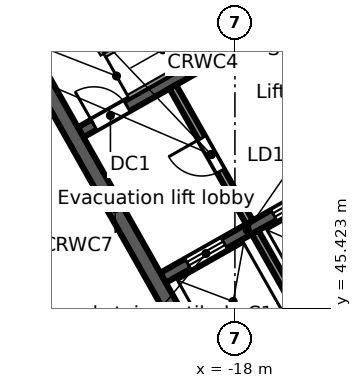
"""IFC4 building model, lengths in metres.
Left out: names, types, materials, properties, quantities, classifications, styles, units other than length and angle.
Written with IfcOpenShell. Run it as: python <this file> out.ifc"""

import sys

from ifc_helpers import new_model, si_unit, direction, frame, frame_2d, origin, place, context, subcontext, project, spatial, rectangle, extrude, element, fill, save


model = new_model("IFC4")
c1 = context("Model", 3, precision=1e-05, world=origin(), true_north=direction((0.0, 1.0)))
c2 = subcontext(c1, "Body", "Model", "MODEL_VIEW")
j1 = project(units=[si_unit("LENGTHUNIT", "METRE"), si_unit("PLANEANGLEUNIT", "RADIAN")], contexts=[c1])
p1 = place(None, origin())
s1 = spatial("IfcSite", under=j1, at=p1, CompositionType="ELEMENT")
p2 = place(p1, origin())
s2 = spatial("IfcBuilding", under=s1, at=p2, CompositionType="ELEMENT")
p3 = place(p2, frame((0.0, 0.0, 293.1)))
s3 = spatial("IfcBuildingStorey", under=s2, at=p3, CompositionType="ELEMENT", Elevation=293.1)
p4 = place(p3, frame((-58.732, 38.771, 0.0), z_axis=(0.0, 0.0, 1.0), x_axis=(0.870355615581, 0.492423702137, 0.0)))
e1 = element("IfcWall", 1, at=p4, inside=s3, PredefinedType="STANDARD", context=c2, shape_type="SweptSolid", body=[
    extrude(rectangle(XDim=64.052, YDim=0.25, at=frame_2d((32.026, 0.0))), origin(), (0.0, 0.0, 1.0), 3.52),
])
p5 = place(p4, frame((61.259, 0.0, 0.8)))
e2 = element("IfcOpeningElement", 2, at=p5, cuts=e1, PredefinedType="OPENING", context=c2, shape_type="SweptSolid", body=[
    extrude(rectangle(XDim=2.4, YDim=2.2, at=frame_2d((1.2, 1.1))), frame((0.0, 0.135, 0.0), z_axis=(0.0, -1.0, 0.0), x_axis=(1.0, 0.0, 0.0)), (0.0, 0.0, 1.0), 0.27),
])
p6 = place(p4, frame((58.216, 0.0, 0.8)))
e3 = element("IfcOpeningElement", 3, at=p6, cuts=e1, PredefinedType="OPENING", context=c2, shape_type="SweptSolid", body=[
    extrude(rectangle(XDim=2.4, YDim=2.2, at=frame_2d((1.2, 1.1))), frame((0.0, 0.135, 0.0), z_axis=(0.0, -1.0, 0.0), x_axis=(1.0, 0.0, 0.0)), (0.0, 0.0, 1.0), 0.27),
])
p7 = place(p4, frame((55.173, 0.0, 0.8)))
e4 = element("IfcOpeningElement", 4, at=p7, cuts=e1, PredefinedType="OPENING", context=c2, shape_type="SweptSolid", body=[
    extrude(rectangle(XDim=2.4, YDim=2.2, at=frame_2d((1.2, 1.1))), frame((0.0, 0.135, 0.0), z_axis=(0.0, -1.0, 0.0), x_axis=(1.0, 0.0, 0.0)), (0.0, 0.0, 1.0), 0.27),
])
p8 = place(p4, frame((52.129, 0.0, 0.8)))
e5 = element("IfcOpeningElement", 5, at=p8, cuts=e1, PredefinedType="OPENING", context=c2, shape_type="SweptSolid", body=[
    extrude(rectangle(XDim=2.4, YDim=2.2, at=frame_2d((1.2, 1.1))), frame((0.0, 0.135, 0.0), z_axis=(0.0, -1.0, 0.0), x_axis=(1.0, 0.0, 0.0)), (0.0, 0.0, 1.0), 0.27),
])
p9 = place(p4, frame((49.086, 0.0, 0.8)))
e6 = element("IfcOpeningElement", 6, at=p9, cuts=e1, PredefinedType="OPENING", context=c2, shape_type="SweptSolid", body=[
    extrude(rectangle(XDim=2.4, YDim=2.2, at=frame_2d((1.2, 1.1))), frame((0.0, 0.135, 0.0), z_axis=(0.0, -1.0, 0.0), x_axis=(1.0, 0.0, 0.0)), (0.0, 0.0, 1.0), 0.27),
])
p10 = place(p4, frame((46.043, 0.0, 0.8)))
e7 = element("IfcOpeningElement", 7, at=p10, cuts=e1, PredefinedType="OPENING", context=c2, shape_type="SweptSolid", body=[
    extrude(rectangle(XDim=2.4, YDim=2.2, at=frame_2d((1.2, 1.1))), frame((0.0, 0.135, 0.0), z_axis=(0.0, -1.0, 0.0), x_axis=(1.0, 0.0, 0.0)), (0.0, 0.0, 1.0), 0.27),
])
p11 = place(p4, frame((43.0, 0.0, 0.8)))
e8 = element("IfcOpeningElement", 8, at=p11, cuts=e1, PredefinedType="OPENING", context=c2, shape_type="SweptSolid", body=[
    extrude(rectangle(XDim=2.4, YDim=2.2, at=frame_2d((1.2, 1.1))), frame((0.0, 0.135, 0.0), z_axis=(0.0, -1.0, 0.0), x_axis=(1.0, 0.0, 0.0)), (0.0, 0.0, 1.0), 0.27),
])
p12 = place(p4, frame((39.956, 0.0, 0.8)))
e9 = element("IfcOpeningElement", 9, at=p12, cuts=e1, PredefinedType="OPENING", context=c2, shape_type="SweptSolid", body=[
    extrude(rectangle(XDim=2.4, YDim=2.2, at=frame_2d((1.2, 1.1))), frame((0.0, 0.135, 0.0), z_axis=(0.0, -1.0, 0.0), x_axis=(1.0, 0.0, 0.0)), (0.0, 0.0, 1.0), 0.27),
])
p13 = place(p4, frame((36.913, 0.0, 0.8)))
e10 = element("IfcOpeningElement", 10, at=p13, cuts=e1, PredefinedType="OPENING", context=c2, shape_type="SweptSolid", body=[
    extrude(rectangle(XDim=2.4, YDim=2.2, at=frame_2d((1.2, 1.1))), frame((0.0, 0.135, 0.0), z_axis=(0.0, -1.0, 0.0), x_axis=(1.0, 0.0, 0.0)), (0.0, 0.0, 1.0), 0.27),
])
p14 = place(p4, frame((33.87, 0.0, 0.8)))
e11 = element("IfcOpeningElement", 11, at=p14, cuts=e1, PredefinedType="OPENING", context=c2, shape_type="SweptSolid", body=[
    extrude(rectangle(XDim=2.4, YDim=2.2, at=frame_2d((1.2, 1.1))), frame((0.0, 0.135, 0.0), z_axis=(0.0, -1.0, 0.0), x_axis=(1.0, 0.0, 0.0)), (0.0, 0.0, 1.0), 0.27),
])
p15 = place(p4, frame((30.826, 0.0, 0.8)))
e12 = element("IfcOpeningElement", 12, at=p15, cuts=e1, PredefinedType="OPENING", context=c2, shape_type="SweptSolid", body=[
    extrude(rectangle(XDim=2.4, YDim=2.2, at=frame_2d((1.2, 1.1))), frame((0.0, 0.135, 0.0), z_axis=(0.0, -1.0, 0.0), x_axis=(1.0, 0.0, 0.0)), (0.0, 0.0, 1.0), 0.27),
])
p16 = place(p4, frame((27.783, 0.0, 0.8)))
e13 = element("IfcOpeningElement", 13, at=p16, cuts=e1, PredefinedType="OPENING", context=c2, shape_type="SweptSolid", body=[
    extrude(rectangle(XDim=2.4, YDim=2.2, at=frame_2d((1.2, 1.1))), frame((0.0, 0.135, 0.0), z_axis=(0.0, -1.0, 0.0), x_axis=(1.0, 0.0, 0.0)), (0.0, 0.0, 1.0), 0.27),
])
p17 = place(p4, frame((24.74, 0.0, 0.8)))
e14 = element("IfcOpeningElement", 14, at=p17, cuts=e1, PredefinedType="OPENING", context=c2, shape_type="SweptSolid", body=[
    extrude(rectangle(XDim=2.4, YDim=2.2, at=frame_2d((1.2, 1.1))), frame((0.0, 0.135, 0.0), z_axis=(0.0, -1.0, 0.0), x_axis=(1.0, 0.0, 0.0)), (0.0, 0.0, 1.0), 0.27),
])
p18 = place(p4, frame((21.696, 0.0, 0.8)))
e15 = element("IfcOpeningElement", 15, at=p18, cuts=e1, PredefinedType="OPENING", context=c2, shape_type="SweptSolid", body=[
    extrude(rectangle(XDim=2.4, YDim=2.2, at=frame_2d((1.2, 1.1))), frame((0.0, 0.135, 0.0), z_axis=(0.0, -1.0, 0.0), x_axis=(1.0, 0.0, 0.0)), (0.0, 0.0, 1.0), 0.27),
])
p19 = place(p4, frame((18.653, 0.0, 0.8)))
e16 = element("IfcOpeningElement", 16, at=p19, cuts=e1, PredefinedType="OPENING", context=c2, shape_type="SweptSolid", body=[
    extrude(rectangle(XDim=2.4, YDim=2.2, at=frame_2d((1.2, 1.1))), frame((0.0, 0.135, 0.0), z_axis=(0.0, -1.0, 0.0), x_axis=(1.0, 0.0, 0.0)), (0.0, 0.0, 1.0), 0.27),
])
p20 = place(p4, frame((15.61, 0.0, 0.8)))
e17 = element("IfcOpeningElement", 17, at=p20, cuts=e1, PredefinedType="OPENING", context=c2, shape_type="SweptSolid", body=[
    extrude(rectangle(XDim=2.4, YDim=2.2, at=frame_2d((1.2, 1.1))), frame((0.0, 0.135, 0.0), z_axis=(0.0, -1.0, 0.0), x_axis=(1.0, 0.0, 0.0)), (0.0, 0.0, 1.0), 0.27),
])
p21 = place(p4, frame((12.567, 0.0, 0.8)))
e18 = element("IfcOpeningElement", 18, at=p21, cuts=e1, PredefinedType="OPENING", context=c2, shape_type="SweptSolid", body=[
    extrude(rectangle(XDim=2.4, YDim=2.2, at=frame_2d((1.2, 1.1))), frame((0.0, 0.135, 0.0), z_axis=(0.0, -1.0, 0.0), x_axis=(1.0, 0.0, 0.0)), (0.0, 0.0, 1.0), 0.27),
])
p22 = place(p4, frame((9.523, 0.0, 0.8)))
e19 = element("IfcOpeningElement", 19, at=p22, cuts=e1, PredefinedType="OPENING", context=c2, shape_type="SweptSolid", body=[
    extrude(rectangle(XDim=2.4, YDim=2.2, at=frame_2d((1.2, 1.1))), frame((0.0, 0.135, 0.0), z_axis=(0.0, -1.0, 0.0), x_axis=(1.0, 0.0, 0.0)), (0.0, 0.0, 1.0), 0.27),
])
p23 = place(p4, frame((6.48, 0.0, 0.8)))
e20 = element("IfcOpeningElement", 20, at=p23, cuts=e1, PredefinedType="OPENING", context=c2, shape_type="SweptSolid", body=[
    extrude(rectangle(XDim=2.4, YDim=2.2, at=frame_2d((1.2, 1.1))), frame((0.0, 0.135, 0.0), z_axis=(0.0, -1.0, 0.0), x_axis=(1.0, 0.0, 0.0)), (0.0, 0.0, 1.0), 0.27),
])
p24 = place(p4, frame((3.437, 0.0, 0.8)))
e21 = element("IfcOpeningElement", 21, at=p24, cuts=e1, PredefinedType="OPENING", context=c2, shape_type="SweptSolid", body=[
    extrude(rectangle(XDim=2.4, YDim=2.2, at=frame_2d((1.2, 1.1))), frame((0.0, 0.135, 0.0), z_axis=(0.0, -1.0, 0.0), x_axis=(1.0, 0.0, 0.0)), (0.0, 0.0, 1.0), 0.27),
])
p25 = place(p4, frame((0.393, 0.0, 0.8)))
e22 = element("IfcOpeningElement", 22, at=p25, cuts=e1, PredefinedType="OPENING", context=c2, shape_type="SweptSolid", body=[
    extrude(rectangle(XDim=2.4, YDim=2.2, at=frame_2d((1.2, 1.1))), frame((0.0, 0.135, 0.0), z_axis=(0.0, -1.0, 0.0), x_axis=(1.0, 0.0, 0.0)), (0.0, 0.0, 1.0), 0.27),
])
p26 = place(p3, frame((-3.017, 46.293, 0.0), z_axis=(0.0, 0.0, 1.0), x_axis=(-0.870355474887, -0.492423950812, 0.0)))
e23 = element("IfcWall", 23, at=p26, inside=s3, PredefinedType="STANDARD", context=c2, shape_type="SweptSolid", body=[
    extrude(rectangle(XDim=40.34, YDim=0.25, at=frame_2d((20.17, 0.0))), origin(), (0.0, 0.0, 1.0), 3.52),
])
p27 = place(p26, frame((37.428, 0.0, 0.8)))
e24 = element("IfcOpeningElement", 24, at=p27, cuts=e23, PredefinedType="OPENING", context=c2, shape_type="SweptSolid", body=[
    extrude(rectangle(XDim=2.4, YDim=2.2, at=frame_2d((1.2, 1.1))), frame((0.0, 0.135, 0.0), z_axis=(0.0, -1.0, 0.0), x_axis=(1.0, 0.0, 0.0)), (0.0, 0.0, 1.0), 0.27),
])
p28 = place(p26, frame((34.372, 0.0, 0.0)))
e25 = element("IfcOpeningElement", 25, at=p28, cuts=e23, PredefinedType="OPENING", context=c2, shape_type="SweptSolid", body=[
    extrude(rectangle(XDim=1.8, YDim=2.4, at=frame_2d((0.9, 1.2))), frame((0.0, 0.135, 0.0), z_axis=(0.0, -1.0, 0.0), x_axis=(1.0, 0.0, 0.0)), (0.0, 0.0, 1.0), 0.27),
])
p29 = place(p26, frame((30.716, 0.0, 0.8)))
e26 = element("IfcOpeningElement", 26, at=p29, cuts=e23, PredefinedType="OPENING", context=c2, shape_type="SweptSolid", body=[
    extrude(rectangle(XDim=2.4, YDim=2.2, at=frame_2d((1.2, 1.1))), frame((0.0, 0.135, 0.0), z_axis=(0.0, -1.0, 0.0), x_axis=(1.0, 0.0, 0.0)), (0.0, 0.0, 1.0), 0.27),
])
p30 = place(p26, frame((27.36, 0.0, 0.8)))
e27 = element("IfcOpeningElement", 27, at=p30, cuts=e23, PredefinedType="OPENING", context=c2, shape_type="SweptSolid", body=[
    extrude(rectangle(XDim=2.4, YDim=2.2, at=frame_2d((1.2, 1.1))), frame((0.0, 0.135, 0.0), z_axis=(0.0, -1.0, 0.0), x_axis=(1.0, 0.0, 0.0)), (0.0, 0.0, 1.0), 0.27),
])
p31 = place(p26, frame((24.304, 0.0, 0.0)))
e28 = element("IfcOpeningElement", 28, at=p31, cuts=e23, PredefinedType="OPENING", context=c2, shape_type="SweptSolid", body=[
    extrude(rectangle(XDim=1.8, YDim=2.4, at=frame_2d((0.9, 1.2))), frame((0.0, 0.135, 0.0), z_axis=(0.0, -1.0, 0.0), x_axis=(1.0, 0.0, 0.0)), (0.0, 0.0, 1.0), 0.27),
])
p32 = place(p26, frame((20.648, 0.0, 0.8)))
e29 = element("IfcOpeningElement", 29, at=p32, cuts=e23, PredefinedType="OPENING", context=c2, shape_type="SweptSolid", body=[
    extrude(rectangle(XDim=2.4, YDim=2.2, at=frame_2d((1.2, 1.1))), frame((0.0, 0.135, 0.0), z_axis=(0.0, -1.0, 0.0), x_axis=(1.0, 0.0, 0.0)), (0.0, 0.0, 1.0), 0.27),
])
p33 = place(p26, frame((17.292, 0.0, 0.8)))
e30 = element("IfcOpeningElement", 30, at=p33, cuts=e23, PredefinedType="OPENING", context=c2, shape_type="SweptSolid", body=[
    extrude(rectangle(XDim=2.4, YDim=2.2, at=frame_2d((1.2, 1.1))), frame((0.0, 0.135, 0.0), z_axis=(0.0, -1.0, 0.0), x_axis=(1.0, 0.0, 0.0)), (0.0, 0.0, 1.0), 0.27),
])
p34 = place(p26, frame((14.236, 0.0, 0.0)))
e31 = element("IfcOpeningElement", 31, at=p34, cuts=e23, PredefinedType="OPENING", context=c2, shape_type="SweptSolid", body=[
    extrude(rectangle(XDim=1.8, YDim=2.4, at=frame_2d((0.9, 1.2))), frame((0.0, 0.135, 0.0), z_axis=(0.0, -1.0, 0.0), x_axis=(1.0, 0.0, 0.0)), (0.0, 0.0, 1.0), 0.27),
])
p35 = place(p26, frame((10.58, 0.0, 0.8)))
e32 = element("IfcOpeningElement", 32, at=p35, cuts=e23, PredefinedType="OPENING", context=c2, shape_type="SweptSolid", body=[
    extrude(rectangle(XDim=2.4, YDim=2.2, at=frame_2d((1.2, 1.1))), frame((0.0, 0.135, 0.0), z_axis=(0.0, -1.0, 0.0), x_axis=(1.0, 0.0, 0.0)), (0.0, 0.0, 1.0), 0.27),
])
p36 = place(p26, frame((7.224, 0.0, 0.8)))
e33 = element("IfcOpeningElement", 33, at=p36, cuts=e23, PredefinedType="OPENING", context=c2, shape_type="SweptSolid", body=[
    extrude(rectangle(XDim=2.4, YDim=2.2, at=frame_2d((1.2, 1.1))), frame((0.0, 0.135, 0.0), z_axis=(0.0, -1.0, 0.0), x_axis=(1.0, 0.0, 0.0)), (0.0, 0.0, 1.0), 0.27),
])
p37 = place(p26, frame((4.168, 0.0, 0.0)))
e34 = element("IfcOpeningElement", 34, at=p37, cuts=e23, PredefinedType="OPENING", context=c2, shape_type="SweptSolid", body=[
    extrude(rectangle(XDim=1.8, YDim=2.4, at=frame_2d((0.9, 1.2))), frame((0.0, 0.135, 0.0), z_axis=(0.0, -1.0, 0.0), x_axis=(1.0, 0.0, 0.0)), (0.0, 0.0, 1.0), 0.27),
])
p38 = place(p26, frame((0.512, 0.0, 0.8)))
e35 = element("IfcOpeningElement", 35, at=p38, cuts=e23, PredefinedType="OPENING", context=c2, shape_type="SweptSolid", body=[
    extrude(rectangle(XDim=2.4, YDim=2.2, at=frame_2d((1.2, 1.1))), frame((0.0, 0.135, 0.0), z_axis=(0.0, -1.0, 0.0), x_axis=(1.0, 0.0, 0.0)), (0.0, 0.0, 1.0), 0.27),
])
p39 = place(p3, frame((-17.975, 42.017, 0.0), z_axis=(0.0, 0.0, 1.0), x_axis=(0.87034965173, 0.492434243055, 0.0)))
e36 = element("IfcWall", 36, at=p39, inside=s3, PredefinedType="SOLIDWALL", context=c2, shape_type="SweptSolid", body=[
    extrude(rectangle(XDim=15.0, YDim=0.4, at=frame_2d((7.5, 0.0))), origin(), (0.0, 0.0, 1.0), 3.52),
])
p40 = place(p39, frame((6.1, 0.0, 0.0)))
e37 = element("IfcOpeningElement", 37, at=p40, cuts=e36, PredefinedType="OPENING", context=c2, shape_type="SweptSolid", body=[
    extrude(rectangle(XDim=1.2, YDim=2.1, at=frame_2d((0.6, 1.05))), frame((0.0, 0.21, 0.0), z_axis=(0.0, -1.0, 0.0), x_axis=(1.0, 0.0, 0.0)), (0.0, 0.0, 1.0), 0.42),
])
p41 = place(p3, frame((-19.892, 46.218, 0.0), z_axis=(0.0, 0.0, 1.0), x_axis=(0.870341639186, 0.492448404505, 0.0)))
e38 = element("IfcWall", 38, at=p41, inside=s3, PredefinedType="SOLIDWALL", context=c2, shape_type="SweptSolid", body=[
    extrude(rectangle(XDim=5.1, YDim=0.3, at=frame_2d((2.55, 0.0))), origin(), (0.0, 0.0, 1.0), 3.52),
])
p42 = place(p41, frame((0.75, 0.0, 0.0)))
e39 = element("IfcOpeningElement", 39, at=p42, cuts=e38, PredefinedType="OPENING", context=c2, shape_type="SweptSolid", body=[
    extrude(rectangle(XDim=1.1, YDim=2.1, at=frame_2d((0.55, 1.05))), frame((0.0, 0.16, 0.0), z_axis=(0.0, -1.0, 0.0), x_axis=(1.0, 0.0, 0.0)), (0.0, 0.0, 1.0), 0.32),
])
p43 = place(p41, frame((3.35, 0.0, 0.0)))
e40 = element("IfcOpeningElement", 40, at=p43, cuts=e38, PredefinedType="OPENING", context=c2, shape_type="SweptSolid", body=[
    extrude(rectangle(XDim=1.1, YDim=2.1, at=frame_2d((0.55, 1.05))), frame((0.0, 0.16, 0.0), z_axis=(0.0, -1.0, 0.0), x_axis=(1.0, 0.0, 0.0)), (0.0, 0.0, 1.0), 0.32),
])
p44 = place(p3, frame((-22.059, 50.047, 0.0), z_axis=(0.0, 0.0, 1.0), x_axis=(0.87035077051, 0.49243226567, 0.0)))
e41 = element("IfcWall", 41, at=p44, inside=s3, PredefinedType="SOLIDWALL", context=c2, shape_type="SweptSolid", body=[
    extrude(rectangle(XDim=7.4, YDim=0.3, at=frame_2d((3.7, 0.0))), origin(), (0.0, 0.0, 1.0), 3.52),
])
p45 = place(p44, frame((0.4, 0.0, 0.0)))
e42 = element("IfcOpeningElement", 42, at=p45, cuts=e41, PredefinedType="OPENING", context=c2, shape_type="SweptSolid", body=[
    extrude(rectangle(XDim=1.0, YDim=2.1, at=frame_2d((0.5, 1.05))), frame((0.0, 0.16, 0.0), z_axis=(0.0, -1.0, 0.0), x_axis=(1.0, 0.0, 0.0)), (0.0, 0.0, 1.0), 0.32),
])
p46 = place(p3, frame((-24.4, 53.779, 0.0), z_axis=(0.0, 0.0, 1.0), x_axis=(0.492421663121, -0.870356769198, 0.0)))
e43 = element("IfcWall", 43, at=p46, inside=s3, PredefinedType="SOLIDWALL", context=c2, shape_type="SweptSolid", body=[
    extrude(rectangle(XDim=13.2, YDim=0.4, at=frame_2d((6.6, 0.0))), origin(), (0.0, 0.0, 1.0), 3.52),
])
p47 = place(p3, frame((-17.469, 47.417, 0.0), z_axis=(0.0, 0.0, 1.0), x_axis=(0.492466057713, -0.870331650579, 0.0)))
e44 = element("IfcWall", 44, at=p47, inside=s3, PredefinedType="SOLIDWALL", context=c2, shape_type="SweptSolid", body=[
    extrude(rectangle(XDim=4.25, YDim=0.2, at=frame_2d((2.125, 0.0))), origin(), (0.0, 0.0, 1.0), 3.52),
])
p48 = place(p3, frame((-19.635, 51.246, 0.0), z_axis=(0.0, 0.0, 1.0), x_axis=(0.492408451753, -0.87036424366, 0.0)))
e45 = element("IfcWall", 45, at=p48, inside=s3, PredefinedType="PARTITIONING", context=c2, shape_type="SweptSolid", body=[
    extrude(rectangle(XDim=4.1, YDim=0.2, at=frame_2d((2.05, 0.0))), origin(), (0.0, 0.0, 1.0), 3.52),
])
p49 = place(p48, frame((1.55, 0.0, 0.0)))
e46 = element("IfcOpeningElement", 46, at=p49, cuts=e45, PredefinedType="OPENING", context=c2, shape_type="SweptSolid", body=[
    extrude(rectangle(XDim=1.0, YDim=2.1, at=frame_2d((0.5, 1.05))), frame((0.0, 0.11, 0.0), z_axis=(0.0, -1.0, 0.0), x_axis=(1.0, 0.0, 0.0)), (0.0, 0.0, 1.0), 0.22),
])
p50 = place(p42, origin())
e47 = element("IfcDoor", 47, at=p50, inside=s3, OperationType="DOUBLE_DOOR_SLIDING", PredefinedType="DOOR", context=c2, shape_type="SweptSolid", body=[
    extrude(rectangle(XDim=1.1, YDim=2.1, at=frame_2d((0.55, 1.05))), frame((0.0, 0.025, 0.0), z_axis=(0.0, -1.0, 0.0), x_axis=(1.0, 0.0, 0.0)), (0.0, 0.0, 1.0), 0.05),
])
fill(e39, e47)
p51 = place(p43, origin())
e48 = element("IfcDoor", 48, at=p51, inside=s3, OperationType="DOUBLE_DOOR_SLIDING", PredefinedType="DOOR", context=c2, shape_type="SweptSolid", body=[
    extrude(rectangle(XDim=1.1, YDim=2.1, at=frame_2d((0.55, 1.05))), frame((0.0, 0.025, 0.0), z_axis=(0.0, -1.0, 0.0), x_axis=(1.0, 0.0, 0.0)), (0.0, 0.0, 1.0), 0.05),
])
fill(e40, e48)
p52 = place(p45, origin())
e49 = element("IfcDoor", 49, at=p52, inside=s3, OperationType="SINGLE_SWING_LEFT", PredefinedType="DOOR", context=c2, shape_type="SweptSolid", body=[
    extrude(rectangle(XDim=1.0, YDim=2.1, at=frame_2d((0.5, 1.05))), frame((0.0, 0.025, 0.0), z_axis=(0.0, -1.0, 0.0), x_axis=(1.0, 0.0, 0.0)), (0.0, 0.0, 1.0), 0.05),
])
fill(e42, e49)
p53 = place(p49, frame((1.0, 0.0, 0.0), z_axis=(0.0, 0.0, 1.0), x_axis=(-1.0, 0.0, 0.0)))
e50 = element("IfcDoor", 50, at=p53, inside=s3, OperationType="SINGLE_SWING_RIGHT", PredefinedType="DOOR", context=c2, shape_type="SweptSolid", body=[
    extrude(rectangle(XDim=1.0, YDim=2.1, at=frame_2d((0.5, 1.05))), frame((0.0, 0.025, 0.0), z_axis=(0.0, -1.0, 0.0), x_axis=(1.0, 0.0, 0.0)), (0.0, 0.0, 1.0), 0.05),
])
fill(e46, e50)
save(model, sys.argv[1])
